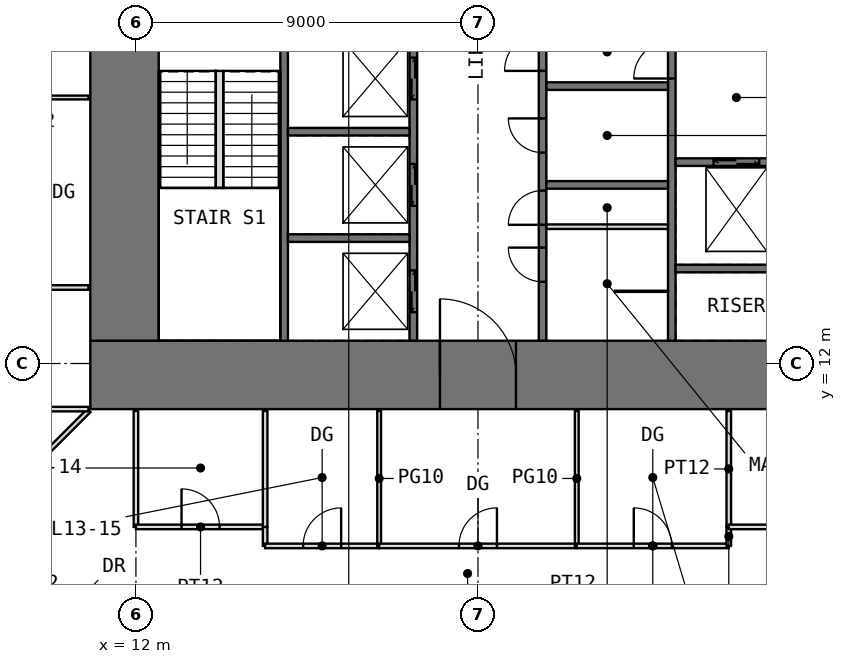
"""IFC4 building model, lengths in metres.
Left out: names, types, materials, properties, quantities, classifications, styles, units other than length and angle.
Written with IfcOpenShell. Run it as: python <this file> out.ifc"""

import sys

from ifc_helpers import new_model, si_unit, direction, frame, frame_2d, origin, place, context, subcontext, project, spatial, rectangle, extrude, element, fill, save


model = new_model("IFC4")
c1 = context("Model", 3, precision=1e-05, world=origin(), true_north=direction((0.0, 1.0)))
c2 = subcontext(c1, "Body", "Model", "MODEL_VIEW")
j1 = project(units=[si_unit("LENGTHUNIT", "METRE"), si_unit("PLANEANGLEUNIT", "RADIAN")], contexts=[c1])
p1 = place(None, origin())
s1 = spatial("IfcSite", under=j1, at=p1, CompositionType="ELEMENT")
p2 = place(p1, origin())
s2 = spatial("IfcBuilding", under=s1, at=p2, CompositionType="ELEMENT")
p3 = place(p2, frame((0.0, 0.0, 58.5)))
s3 = spatial("IfcBuildingStorey", under=s2, at=p3, CompositionType="ELEMENT", Elevation=58.5)
p4 = place(p3, frame((10.8, 11.7, -0.05), z_axis=(0.0, 0.0, 1.0), x_axis=(1.0, 0.0, 0.0)))
e1 = element("IfcWall", 1, at=p4, inside=s3, PredefinedType="SHEAR", context=c2, shape_type="SweptSolid", body=[
    extrude(rectangle(XDim=20.4, YDim=1.8, at=frame_2d((10.2, 0.0))), origin(), (0.0, 0.0, 1.0), 4.0),
])
p5 = place(p4, frame((9.2, 0.0, 0.05)))
e2 = element("IfcOpeningElement", 2, at=p5, cuts=e1, PredefinedType="OPENING", context=c2, shape_type="SweptSolid", body=[
    extrude(rectangle(XDim=2.0, YDim=2.2, at=frame_2d((1.0, 1.1))), frame((0.0, 0.91, 0.0), z_axis=(0.0, -1.0, 0.0), x_axis=(1.0, 0.0, 0.0)), (0.0, 0.0, 1.0), 1.82),
])
p6 = place(p3, frame((11.7, 12.6, -0.05), z_axis=(0.0, 0.0, 1.0), x_axis=(0.0, 1.0, 0.0)))
e3 = element("IfcWall", 3, at=p6, inside=s3, PredefinedType="SHEAR", context=c2, shape_type="SweptSolid", body=[
    extrude(rectangle(XDim=16.8, YDim=1.8, at=frame_2d((8.4, 0.0))), origin(), (0.0, 0.0, 1.0), 4.0),
])
p7 = place(p6, frame((9.9, 0.0, 0.05)))
e4 = element("IfcOpeningElement", 4, at=p7, cuts=e3, PredefinedType="OPENING", context=c2, shape_type="SweptSolid", body=[
    extrude(rectangle(XDim=1.0, YDim=2.2, at=frame_2d((0.5, 1.1))), frame((0.0, 0.91, 0.0), z_axis=(0.0, -1.0, 0.0), x_axis=(1.0, 0.0, 0.0)), (0.0, 0.0, 1.0), 1.82),
])
p8 = place(p3, frame((15.9, 12.6, -0.05), z_axis=(0.0, 0.0, 1.0), x_axis=(0.0, 1.0, 0.0)))
e5 = element("IfcWall", 5, at=p8, inside=s3, PredefinedType="SHEAR", context=c2, shape_type="SweptSolid", body=[
    extrude(rectangle(XDim=16.8, YDim=0.2, at=frame_2d((8.4, 0.0))), origin(), (0.0, 0.0, 1.0), 4.0),
])
p9 = place(p8, frame((8.9, 0.0, 0.05)))
e6 = element("IfcOpeningElement", 6, at=p9, cuts=e5, PredefinedType="OPENING", context=c2, shape_type="SweptSolid", body=[
    extrude(rectangle(XDim=1.0, YDim=2.2, at=frame_2d((0.5, 1.1))), frame((0.0, 0.11, 0.0), z_axis=(0.0, -1.0, 0.0), x_axis=(1.0, 0.0, 0.0)), (0.0, 0.0, 1.0), 0.22),
])
p10 = place(p3, frame((19.3, 12.6, -0.05), z_axis=(0.0, 0.0, 1.0), x_axis=(0.0, 1.0, 0.0)))
e7 = element("IfcWall", 7, at=p10, inside=s3, PredefinedType="SHEAR", context=c2, shape_type="SweptSolid", body=[
    extrude(rectangle(XDim=16.8, YDim=0.2, at=frame_2d((8.4, 0.0))), origin(), (0.0, 0.0, 1.0), 4.0),
])
p11 = place(p10, frame((8.7, 0.0, 0.05)))
e8 = element("IfcOpeningElement", 8, at=p11, cuts=e7, PredefinedType="OPENING", context=c2, shape_type="SweptSolid", body=[
    extrude(rectangle(XDim=1.0, YDim=2.2, at=frame_2d((0.5, 1.1))), frame((0.0, 0.11, 0.0), z_axis=(0.0, -1.0, 0.0), x_axis=(1.0, 0.0, 0.0)), (0.0, 0.0, 1.0), 0.22),
])
p12 = place(p10, frame((10.85, 0.0, 0.05)))
e9 = element("IfcOpeningElement", 9, at=p12, cuts=e7, PredefinedType="OPENING", context=c2, shape_type="SweptSolid", body=[
    extrude(rectangle(XDim=0.9, YDim=2.2, at=frame_2d((0.45, 1.1))), frame((0.0, 0.11, 0.0), z_axis=(0.0, -1.0, 0.0), x_axis=(1.0, 0.0, 0.0)), (0.0, 0.0, 1.0), 0.22),
])
p13 = place(p10, frame((13.3, 0.0, 0.05)))
e10 = element("IfcOpeningElement", 10, at=p13, cuts=e7, PredefinedType="OPENING", context=c2, shape_type="SweptSolid", body=[
    extrude(rectangle(XDim=1.0, YDim=2.2, at=frame_2d((0.5, 1.1))), frame((0.0, 0.11, 0.0), z_axis=(0.0, -1.0, 0.0), x_axis=(1.0, 0.0, 0.0)), (0.0, 0.0, 1.0), 0.22),
])
p14 = place(p10, frame((15.55, 0.0, 0.05)))
e11 = element("IfcOpeningElement", 11, at=p14, cuts=e7, PredefinedType="OPENING", context=c2, shape_type="SweptSolid", body=[
    extrude(rectangle(XDim=0.9, YDim=2.2, at=frame_2d((0.45, 1.1))), frame((0.0, 0.11, 0.0), z_axis=(0.0, -1.0, 0.0), x_axis=(1.0, 0.0, 0.0)), (0.0, 0.0, 1.0), 0.22),
])
p15 = place(p10, frame((0.75, 0.0, 0.05)))
e12 = element("IfcOpeningElement", 12, at=p15, cuts=e7, PredefinedType="OPENING", context=c2, shape_type="SweptSolid", body=[
    extrude(rectangle(XDim=1.1, YDim=2.2, at=frame_2d((0.55, 1.1))), frame((0.0, 0.11, 0.0), z_axis=(0.0, -1.0, 0.0), x_axis=(1.0, 0.0, 0.0)), (0.0, 0.0, 1.0), 0.22),
])
p16 = place(p10, frame((3.55, 0.0, 0.05)))
e13 = element("IfcOpeningElement", 13, at=p16, cuts=e7, PredefinedType="OPENING", context=c2, shape_type="SweptSolid", body=[
    extrude(rectangle(XDim=1.1, YDim=2.2, at=frame_2d((0.55, 1.1))), frame((0.0, 0.11, 0.0), z_axis=(0.0, -1.0, 0.0), x_axis=(1.0, 0.0, 0.0)), (0.0, 0.0, 1.0), 0.22),
])
p17 = place(p10, frame((6.35, 0.0, 0.05)))
e14 = element("IfcOpeningElement", 14, at=p17, cuts=e7, PredefinedType="OPENING", context=c2, shape_type="SweptSolid", body=[
    extrude(rectangle(XDim=1.1, YDim=2.2, at=frame_2d((0.55, 1.1))), frame((0.0, 0.11, 0.0), z_axis=(0.0, -1.0, 0.0), x_axis=(1.0, 0.0, 0.0)), (0.0, 0.0, 1.0), 0.22),
])
p18 = place(p3, frame((22.7, 12.6, -0.05), z_axis=(0.0, 0.0, 1.0), x_axis=(0.0, 1.0, 0.0)))
e15 = element("IfcWall", 15, at=p18, inside=s3, PredefinedType="SHEAR", context=c2, shape_type="SweptSolid", body=[
    extrude(rectangle(XDim=16.8, YDim=0.2, at=frame_2d((8.4, 0.0))), origin(), (0.0, 0.0, 1.0), 4.0),
])
p19 = place(p18, frame((3.05, 0.0, 0.05)))
e16 = element("IfcOpeningElement", 16, at=p19, cuts=e15, PredefinedType="OPENING", context=c2, shape_type="SweptSolid", body=[
    extrude(rectangle(XDim=0.9, YDim=2.2, at=frame_2d((0.45, 1.1))), frame((0.0, 0.11, 0.0), z_axis=(0.0, -1.0, 0.0), x_axis=(1.0, 0.0, 0.0)), (0.0, 0.0, 1.0), 0.22),
])
p20 = place(p18, frame((7.1, 0.0, 0.05)))
e17 = element("IfcOpeningElement", 17, at=p20, cuts=e15, PredefinedType="OPENING", context=c2, shape_type="SweptSolid", body=[
    extrude(rectangle(XDim=1.0, YDim=2.2, at=frame_2d((0.5, 1.1))), frame((0.0, 0.11, 0.0), z_axis=(0.0, -1.0, 0.0), x_axis=(1.0, 0.0, 0.0)), (0.0, 0.0, 1.0), 0.22),
])
p21 = place(p18, frame((1.55, 0.0, 0.05)))
e18 = element("IfcOpeningElement", 18, at=p21, cuts=e15, PredefinedType="OPENING", context=c2, shape_type="SweptSolid", body=[
    extrude(rectangle(XDim=0.9, YDim=2.2, at=frame_2d((0.45, 1.1))), frame((0.0, 0.11, 0.0), z_axis=(0.0, -1.0, 0.0), x_axis=(1.0, 0.0, 0.0)), (0.0, 0.0, 1.0), 0.22),
])
p22 = place(p18, frame((4.95, 0.0, 0.05)))
e19 = element("IfcOpeningElement", 19, at=p22, cuts=e15, PredefinedType="OPENING", context=c2, shape_type="SweptSolid", body=[
    extrude(rectangle(XDim=0.9, YDim=2.2, at=frame_2d((0.45, 1.1))), frame((0.0, 0.11, 0.0), z_axis=(0.0, -1.0, 0.0), x_axis=(1.0, 0.0, 0.0)), (0.0, 0.0, 1.0), 0.22),
])
p23 = place(p3, frame((26.1, 12.6, -0.05), z_axis=(0.0, 0.0, 1.0), x_axis=(0.0, 1.0, 0.0)))
e20 = element("IfcWall", 20, at=p23, inside=s3, PredefinedType="SHEAR", context=c2, shape_type="SweptSolid", body=[
    extrude(rectangle(XDim=16.8, YDim=0.2, at=frame_2d((8.4, 0.0))), origin(), (0.0, 0.0, 1.0), 4.0),
])
p24 = place(p23, frame((6.9, 0.0, 0.05)))
e21 = element("IfcOpeningElement", 21, at=p24, cuts=e20, PredefinedType="OPENING", context=c2, shape_type="SweptSolid", body=[
    extrude(rectangle(XDim=1.0, YDim=2.2, at=frame_2d((0.5, 1.1))), frame((0.0, 0.11, 0.0), z_axis=(0.0, -1.0, 0.0), x_axis=(1.0, 0.0, 0.0)), (0.0, 0.0, 1.0), 0.22),
])
for number, where, z_axis, x_axis in (
    (22, (16.0, 15.3, -0.05), (0.0, 0.0, 1.0), (1.0, 0.0, 0.0)),
    (23, (16.0, 18.1, -0.05), (0.0, 0.0, 1.0), (1.0, 0.0, 0.0)),
    (24, (22.8, 16.7, -0.05), (0.0, 0.0, 1.0), (1.0, 0.0, 0.0)),
    (25, (22.8, 19.3, -0.05), (0.0, 0.0, 1.0), (1.0, 0.0, 0.0)),
    (26, (26.2, 14.5, -0.05), (0.0, 0.0, 1.0), (1.0, 0.0, 0.0)),
):
    element("IfcWall", number, at=place(p3, frame(where, z_axis=z_axis, x_axis=x_axis)), inside=s3, PredefinedType="SHEAR", context=c2, shape_type="SweptSolid", body=[
        extrude(rectangle(XDim=3.2, YDim=0.2, at=frame_2d((1.6, 0.0))), origin(), (0.0, 0.0, 1.0), 4.0),
    ])
p25 = place(p3, frame((26.2, 17.3, -0.05), z_axis=(0.0, 0.0, 1.0), x_axis=(1.0, 0.0, 0.0)))
e27 = element("IfcWall", 27, at=p25, inside=s3, PredefinedType="SHEAR", context=c2, shape_type="SweptSolid", body=[
    extrude(rectangle(XDim=3.2, YDim=0.2, at=frame_2d((1.6, 0.0))), origin(), (0.0, 0.0, 1.0), 4.0),
])
p26 = place(p25, frame((1.0, 0.0, 0.05)))
e28 = element("IfcOpeningElement", 28, at=p26, cuts=e27, PredefinedType="OPENING", context=c2, shape_type="SweptSolid", body=[
    extrude(rectangle(XDim=1.2, YDim=2.2, at=frame_2d((0.6, 1.1))), frame((0.0, 0.11, 0.0), z_axis=(0.0, -1.0, 0.0), x_axis=(1.0, 0.0, 0.0)), (0.0, 0.0, 1.0), 0.22),
])
p27 = place(p3, frame((22.8, 15.6, 0.0), z_axis=(0.0, 0.0, 1.0), x_axis=(1.0, 0.0, 0.0)))
e29 = element("IfcWall", 29, at=p27, inside=s3, PredefinedType="PARTITIONING", context=c2, shape_type="SweptSolid", body=[
    extrude(rectangle(XDim=3.2, YDim=0.12, at=frame_2d((1.6, 0.0))), origin(), (0.0, 0.0, 1.0), 3.75),
])
p28 = place(p3, frame((24.6, 13.9, 0.0), z_axis=(0.0, 0.0, 1.0), x_axis=(1.0, 0.0, 0.0)))
e30 = element("IfcWall", 30, at=p28, inside=s3, PredefinedType="PARTITIONING", context=c2, shape_type="SweptSolid", body=[
    extrude(rectangle(XDim=1.4, YDim=0.03, at=frame_2d((0.7, 0.0))), origin(), (0.0, 0.0, 1.0), 3.75),
])
p29 = place(p3, frame((7.11, 7.11, 0.0), z_axis=(0.0, 0.0, 1.0), x_axis=(0.707106781187, 0.707106781187, 0.0)))
e31 = element("IfcWall", 31, at=p29, inside=s3, PredefinedType="PARTITIONING", context=c2, shape_type="SweptSolid", body=[
    extrude(rectangle(XDim=5.168, YDim=0.12, at=frame_2d((2.584, 0.0))), origin(), (0.0, 0.0, 1.0), 3.75),
])
for number, where, z_axis, x_axis in (
    (32, (7.2, 10.8, 0.0), (0.0, 0.0, 1.0), (1.0, 0.0, 0.0)),
    (33, (7.2, 14.0, 0.0), (0.0, 0.0, 1.0), (1.0, 0.0, 0.0)),
):
    element("IfcWall", number, at=place(p3, frame(where, z_axis=z_axis, x_axis=x_axis)), inside=s3, PredefinedType="PARTITIONING", context=c2, shape_type="SweptSolid", body=[
        extrude(rectangle(XDim=3.55, YDim=0.12, at=frame_2d((1.775, 0.0))), origin(), (0.0, 0.0, 1.0), 3.75),
    ])
p30 = place(p3, frame((7.2, 19.0, 0.0), z_axis=(0.0, 0.0, 1.0), x_axis=(1.0, 0.0, 0.0)))
e34 = element("IfcWall", 34, at=p30, inside=s3, PredefinedType="PARTITIONING", context=c2, shape_type="SweptSolid", body=[
    extrude(rectangle(XDim=3.55, YDim=0.1, at=frame_2d((1.775, 0.0))), origin(), (0.0, 0.0, 1.0), 3.75),
])
p31 = place(p3, frame((12.0, 7.7, 0.0), z_axis=(0.0, 0.0, 1.0), x_axis=(0.0, 1.0, 0.0)))
e35 = element("IfcWall", 35, at=p31, inside=s3, PredefinedType="PARTITIONING", context=c2, shape_type="SweptSolid", body=[
    extrude(rectangle(XDim=3.05, YDim=0.12, at=frame_2d((1.525, 0.0))), origin(), (0.0, 0.0, 1.0), 3.75),
])
p32 = place(p3, frame((12.0, 7.7, 0.0), z_axis=(0.0, 0.0, 1.0), x_axis=(1.0, 0.0, 0.0)))
e36 = element("IfcWall", 36, at=p32, inside=s3, PredefinedType="PARTITIONING", context=c2, shape_type="SweptSolid", body=[
    extrude(rectangle(XDim=3.4, YDim=0.12, at=frame_2d((1.7, 0.0))), origin(), (0.0, 0.0, 1.0), 3.75),
])
p33 = place(p32, frame((1.2, 0.0, 0.0)))
e37 = element("IfcOpeningElement", 37, at=p33, cuts=e36, PredefinedType="OPENING", context=c2, shape_type="SweptSolid", body=[
    extrude(rectangle(XDim=1.0, YDim=2.2, at=frame_2d((0.5, 1.1))), frame((0.0, 0.07, 0.0), z_axis=(0.0, -1.0, 0.0), x_axis=(1.0, 0.0, 0.0)), (0.0, 0.0, 1.0), 0.14),
])
p34 = place(p3, frame((15.4, 7.2, 0.0), z_axis=(0.0, 0.0, 1.0), x_axis=(0.0, 1.0, 0.0)))
e38 = element("IfcWall", 38, at=p34, inside=s3, PredefinedType="PARTITIONING", context=c2, shape_type="SweptSolid", body=[
    extrude(rectangle(XDim=0.5, YDim=0.12, at=frame_2d((0.25, 0.0))), origin(), (0.0, 0.0, 1.0), 3.75),
])
p35 = place(p3, frame((15.4, 7.2, 0.0), z_axis=(0.0, 0.0, 1.0), x_axis=(1.0, 0.0, 0.0)))
e39 = element("IfcWall", 39, at=p35, inside=s3, PredefinedType="PARTITIONING", context=c2, shape_type="SweptSolid", body=[
    extrude(rectangle(XDim=3.0, YDim=0.12, at=frame_2d((1.5, 0.0))), origin(), (0.0, 0.0, 1.0), 3.75),
])
p36 = place(p35, frame((1.0, 0.0, 0.0)))
e40 = element("IfcOpeningElement", 40, at=p36, cuts=e39, PredefinedType="OPENING", context=c2, shape_type="SweptSolid", body=[
    extrude(rectangle(XDim=1.0, YDim=2.4, at=frame_2d((0.5, 1.2))), frame((0.0, 0.07, 0.0), z_axis=(0.0, -1.0, 0.0), x_axis=(1.0, 0.0, 0.0)), (0.0, 0.0, 1.0), 0.14),
])
p37 = place(p3, frame((15.4, 7.7, 0.0), z_axis=(0.0, 0.0, 1.0), x_axis=(0.0, 1.0, 0.0)))
e41 = element("IfcWall", 41, at=p37, inside=s3, PredefinedType="PARTITIONING", context=c2, shape_type="SweptSolid", body=[
    extrude(rectangle(XDim=3.05, YDim=0.12, at=frame_2d((1.525, 0.0))), origin(), (0.0, 0.0, 1.0), 3.75),
])
p38 = place(p3, frame((18.4, 7.2, 0.0), z_axis=(0.0, 0.0, 1.0), x_axis=(0.0, 1.0, 0.0)))
e42 = element("IfcWall", 42, at=p38, inside=s3, PredefinedType="PARTITIONING", context=c2, shape_type="SweptSolid", body=[
    extrude(rectangle(XDim=3.55, YDim=0.1, at=frame_2d((1.775, 0.0))), origin(), (0.0, 0.0, 1.0), 3.75),
])
p39 = place(p3, frame((18.4, 7.2, 0.0), z_axis=(0.0, 0.0, 1.0), x_axis=(1.0, 0.0, 0.0)))
e43 = element("IfcWall", 43, at=p39, inside=s3, PredefinedType="PARTITIONING", context=c2, shape_type="SweptSolid", body=[
    extrude(rectangle(XDim=5.2, YDim=0.12, at=frame_2d((2.6, 0.0))), origin(), (0.0, 0.0, 1.0), 3.75),
])
p40 = place(p39, frame((2.1, 0.0, 0.0)))
e44 = element("IfcOpeningElement", 44, at=p40, cuts=e43, PredefinedType="OPENING", context=c2, shape_type="SweptSolid", body=[
    extrude(rectangle(XDim=1.0, YDim=2.4, at=frame_2d((0.5, 1.2))), frame((0.0, 0.07, 0.0), z_axis=(0.0, -1.0, 0.0), x_axis=(1.0, 0.0, 0.0)), (0.0, 0.0, 1.0), 0.14),
])
p41 = place(p3, frame((23.6, 7.2, 0.0), z_axis=(0.0, 0.0, 1.0), x_axis=(0.0, 1.0, 0.0)))
e45 = element("IfcWall", 45, at=p41, inside=s3, PredefinedType="PARTITIONING", context=c2, shape_type="SweptSolid", body=[
    extrude(rectangle(XDim=3.55, YDim=0.1, at=frame_2d((1.775, 0.0))), origin(), (0.0, 0.0, 1.0), 3.75),
])
p42 = place(p3, frame((23.6, 7.2, 0.0), z_axis=(0.0, 0.0, 1.0), x_axis=(1.0, 0.0, 0.0)))
e46 = element("IfcWall", 46, at=p42, inside=s3, PredefinedType="PARTITIONING", context=c2, shape_type="SweptSolid", body=[
    extrude(rectangle(XDim=4.0, YDim=0.12, at=frame_2d((2.0, 0.0))), origin(), (0.0, 0.0, 1.0), 3.75),
])
p43 = place(p42, frame((1.5, 0.0, 0.0)))
e47 = element("IfcOpeningElement", 47, at=p43, cuts=e46, PredefinedType="OPENING", context=c2, shape_type="SweptSolid", body=[
    extrude(rectangle(XDim=1.0, YDim=2.4, at=frame_2d((0.5, 1.2))), frame((0.0, 0.07, 0.0), z_axis=(0.0, -1.0, 0.0), x_axis=(1.0, 0.0, 0.0)), (0.0, 0.0, 1.0), 0.14),
])
p44 = place(p3, frame((27.6, 7.2, 0.0), z_axis=(0.0, 0.0, 1.0), x_axis=(0.0, 1.0, 0.0)))
e48 = element("IfcWall", 48, at=p44, inside=s3, PredefinedType="PARTITIONING", context=c2, shape_type="SweptSolid", body=[
    extrude(rectangle(XDim=0.5, YDim=0.12, at=frame_2d((0.25, 0.0))), origin(), (0.0, 0.0, 1.0), 3.75),
])
p45 = place(p3, frame((27.6, 7.7, 0.0), z_axis=(0.0, 0.0, 1.0), x_axis=(0.0, 1.0, 0.0)))
e49 = element("IfcWall", 49, at=p45, inside=s3, PredefinedType="PARTITIONING", context=c2, shape_type="SweptSolid", body=[
    extrude(rectangle(XDim=3.05, YDim=0.12, at=frame_2d((1.525, 0.0))), origin(), (0.0, 0.0, 1.0), 3.75),
])
p46 = place(p3, frame((27.6, 7.7, 0.0), z_axis=(0.0, 0.0, 1.0), x_axis=(1.0, 0.0, 0.0)))
e50 = element("IfcWall", 50, at=p46, inside=s3, PredefinedType="PARTITIONING", context=c2, shape_type="SweptSolid", body=[
    extrude(rectangle(XDim=3.6, YDim=0.12, at=frame_2d((1.8, 0.0))), origin(), (0.0, 0.0, 1.0), 3.75),
])
p47 = place(p46, frame((1.3, 0.0, 0.0)))
e51 = element("IfcOpeningElement", 51, at=p47, cuts=e50, PredefinedType="OPENING", context=c2, shape_type="SweptSolid", body=[
    extrude(rectangle(XDim=1.0, YDim=2.2, at=frame_2d((0.5, 1.1))), frame((0.0, 0.07, 0.0), z_axis=(0.0, -1.0, 0.0), x_axis=(1.0, 0.0, 0.0)), (0.0, 0.0, 1.0), 0.14),
])
p48 = place(p3, frame((14.2, 16.62, 0.0), z_axis=(0.0, 0.0, 1.0), x_axis=(0.0, 1.0, 0.0)))
e52 = element("IfcWall", 52, at=p48, inside=s3, PredefinedType="PARTITIONING", context=c2, shape_type="SweptSolid", body=[
    extrude(rectangle(XDim=3.08, YDim=0.2, at=frame_2d((1.54, 0.0))), origin(), (0.0, 0.0, 1.0), 4.0),
])
p49 = place(p5, origin())
e53 = element("IfcDoor", 53, at=p49, inside=s3, OperationType="DOUBLE_DOOR_SINGLE_SWING", PredefinedType="DOOR", context=c2, shape_type="SweptSolid", body=[
    extrude(rectangle(XDim=2.0, YDim=2.2, at=frame_2d((1.0, 1.1))), frame((0.0, 0.025, 0.0), z_axis=(0.0, -1.0, 0.0), x_axis=(1.0, 0.0, 0.0)), (0.0, 0.0, 1.0), 0.05),
])
fill(e2, e53)
p50 = place(p19, origin())
e54 = element("IfcDoor", 54, at=p50, inside=s3, OperationType="SINGLE_SWING_LEFT", PredefinedType="DOOR", context=c2, shape_type="SweptSolid", body=[
    extrude(rectangle(XDim=0.9, YDim=2.2, at=frame_2d((0.45, 1.1))), frame((0.0, 0.025, 0.0), z_axis=(0.0, -1.0, 0.0), x_axis=(1.0, 0.0, 0.0)), (0.0, 0.0, 1.0), 0.05),
])
fill(e16, e54)
p51 = place(p24, origin())
e55 = element("IfcDoor", 55, at=p51, inside=s3, OperationType="SINGLE_SWING_LEFT", PredefinedType="DOOR", context=c2, shape_type="SweptSolid", body=[
    extrude(rectangle(XDim=1.0, YDim=2.2, at=frame_2d((0.5, 1.1))), frame((0.0, 0.025, 0.0), z_axis=(0.0, -1.0, 0.0), x_axis=(1.0, 0.0, 0.0)), (0.0, 0.0, 1.0), 0.05),
])
fill(e21, e55)
p52 = place(p20, origin())
e56 = element("IfcDoor", 56, at=p52, inside=s3, OperationType="SINGLE_SWING_LEFT", PredefinedType="DOOR", context=c2, shape_type="SweptSolid", body=[
    extrude(rectangle(XDim=1.0, YDim=2.2, at=frame_2d((0.5, 1.1))), frame((0.0, 0.025, 0.0), z_axis=(0.0, -1.0, 0.0), x_axis=(1.0, 0.0, 0.0)), (0.0, 0.0, 1.0), 0.05),
])
fill(e17, e56)
p53 = place(p21, origin())
e57 = element("IfcDoor", 57, at=p53, inside=s3, OperationType="SINGLE_SWING_RIGHT", PredefinedType="DOOR", context=c2, shape_type="SweptSolid", body=[
    extrude(rectangle(XDim=0.9, YDim=2.2, at=frame_2d((0.45, 1.1))), frame((0.0, 0.025, 0.0), z_axis=(0.0, -1.0, 0.0), x_axis=(1.0, 0.0, 0.0)), (0.0, 0.0, 1.0), 0.05),
])
fill(e18, e57)
p54 = place(p22, origin())
e58 = element("IfcDoor", 58, at=p54, inside=s3, OperationType="SINGLE_SWING_RIGHT", PredefinedType="DOOR", context=c2, shape_type="SweptSolid", body=[
    extrude(rectangle(XDim=0.9, YDim=2.2, at=frame_2d((0.45, 1.1))), frame((0.0, 0.025, 0.0), z_axis=(0.0, -1.0, 0.0), x_axis=(1.0, 0.0, 0.0)), (0.0, 0.0, 1.0), 0.05),
])
fill(e19, e58)
p55 = place(p33, origin())
e59 = element("IfcDoor", 59, at=p55, inside=s3, OperationType="SINGLE_SWING_LEFT", PredefinedType="DOOR", context=c2, shape_type="SweptSolid", body=[
    extrude(rectangle(XDim=1.0, YDim=2.2, at=frame_2d((0.5, 1.1))), frame((0.0, 0.025, 0.0), z_axis=(0.0, -1.0, 0.0), x_axis=(1.0, 0.0, 0.0)), (0.0, 0.0, 1.0), 0.05),
])
fill(e37, e59)
p56 = place(p36, origin())
e60 = element("IfcDoor", 60, at=p56, inside=s3, OperationType="SINGLE_SWING_RIGHT", PredefinedType="DOOR", context=c2, shape_type="SweptSolid", body=[
    extrude(rectangle(XDim=1.0, YDim=2.4, at=frame_2d((0.5, 1.2))), frame((0.0, 0.025, 0.0), z_axis=(0.0, -1.0, 0.0), x_axis=(1.0, 0.0, 0.0)), (0.0, 0.0, 1.0), 0.05),
])
fill(e40, e60)
p57 = place(p43, origin())
e61 = element("IfcDoor", 61, at=p57, inside=s3, OperationType="SINGLE_SWING_LEFT", PredefinedType="DOOR", context=c2, shape_type="SweptSolid", body=[
    extrude(rectangle(XDim=1.0, YDim=2.4, at=frame_2d((0.5, 1.2))), frame((0.0, 0.025, 0.0), z_axis=(0.0, -1.0, 0.0), x_axis=(1.0, 0.0, 0.0)), (0.0, 0.0, 1.0), 0.05),
])
fill(e47, e61)
p58 = place(p40, origin())
e62 = element("IfcDoor", 62, at=p58, inside=s3, OperationType="SINGLE_SWING_RIGHT", PredefinedType="DOOR", context=c2, shape_type="SweptSolid", body=[
    extrude(rectangle(XDim=1.0, YDim=2.4, at=frame_2d((0.5, 1.2))), frame((0.0, 0.025, 0.0), z_axis=(0.0, -1.0, 0.0), x_axis=(1.0, 0.0, 0.0)), (0.0, 0.0, 1.0), 0.05),
])
fill(e44, e62)
p59 = place(p15, origin())
e63 = element("IfcDoor", 63, at=p59, inside=s3, OperationType="DOUBLE_DOOR_SLIDING", PredefinedType="DOOR", context=c2, shape_type="SweptSolid", body=[
    extrude(rectangle(XDim=1.1, YDim=2.2, at=frame_2d((0.55, 1.1))), frame((0.0, 0.025, 0.0), z_axis=(0.0, -1.0, 0.0), x_axis=(1.0, 0.0, 0.0)), (0.0, 0.0, 1.0), 0.05),
])
fill(e12, e63)
p60 = place(p16, origin())
e64 = element("IfcDoor", 64, at=p60, inside=s3, OperationType="DOUBLE_DOOR_SLIDING", PredefinedType="DOOR", context=c2, shape_type="SweptSolid", body=[
    extrude(rectangle(XDim=1.1, YDim=2.2, at=frame_2d((0.55, 1.1))), frame((0.0, 0.025, 0.0), z_axis=(0.0, -1.0, 0.0), x_axis=(1.0, 0.0, 0.0)), (0.0, 0.0, 1.0), 0.05),
])
fill(e13, e64)
p61 = place(p17, origin())
e65 = element("IfcDoor", 65, at=p61, inside=s3, OperationType="DOUBLE_DOOR_SLIDING", PredefinedType="DOOR", context=c2, shape_type="SweptSolid", body=[
    extrude(rectangle(XDim=1.1, YDim=2.2, at=frame_2d((0.55, 1.1))), frame((0.0, 0.025, 0.0), z_axis=(0.0, -1.0, 0.0), x_axis=(1.0, 0.0, 0.0)), (0.0, 0.0, 1.0), 0.05),
])
fill(e14, e65)
p62 = place(p26, origin())
e66 = element("IfcDoor", 66, at=p62, inside=s3, OperationType="DOUBLE_DOOR_SLIDING", PredefinedType="DOOR", context=c2, shape_type="SweptSolid", body=[
    extrude(rectangle(XDim=1.2, YDim=2.2, at=frame_2d((0.6, 1.1))), frame((0.0, 0.025, 0.0), z_axis=(0.0, -1.0, 0.0), x_axis=(1.0, 0.0, 0.0)), (0.0, 0.0, 1.0), 0.05),
])
fill(e28, e66)
save(model, sys.argv[1])
